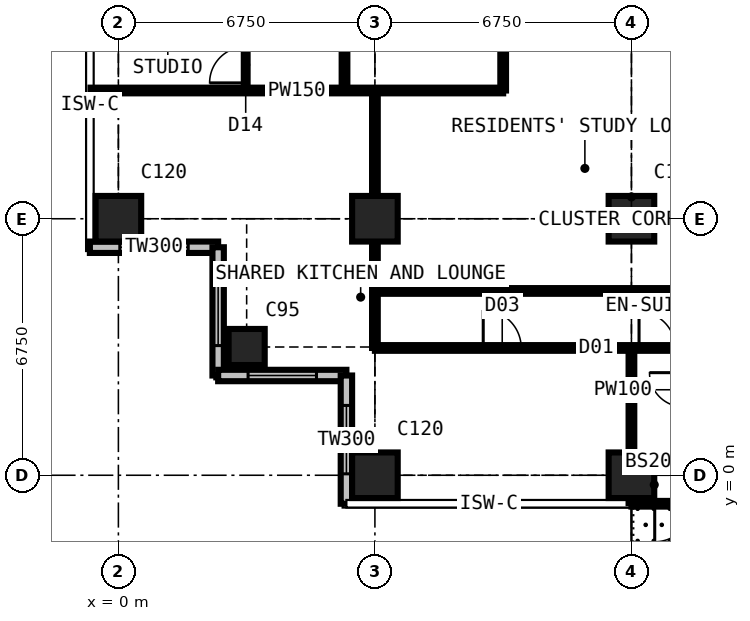
"""IFC4 building model, lengths in metres.
Left out: names, types, materials, properties, quantities, classifications, styles, units other than length and angle.
Written with IfcOpenShell. Run it as: python <this file> out.ifc"""

import sys

from ifc_helpers import new_model, si_unit, direction, frame, frame_2d, origin, origin_2d, place, context, subcontext, project, spatial, rectangle, extrude, element, fill, save


model = new_model("IFC4")
c1 = context("Model", 3, precision=1e-05, world=origin(), true_north=direction((0.0, 1.0)))
c2 = subcontext(c1, "Body", "Model", "MODEL_VIEW")
j1 = project(units=[si_unit("LENGTHUNIT", "METRE"), si_unit("PLANEANGLEUNIT", "RADIAN")], contexts=[c1])
p1 = place(None, origin())
s1 = spatial("IfcSite", under=j1, at=p1, CompositionType="ELEMENT")
p2 = place(p1, origin())
s2 = spatial("IfcBuilding", under=s1, at=p2, CompositionType="ELEMENT")
p3 = place(p2, frame((0.0, 0.0, 192.6)))
s3 = spatial("IfcBuildingStorey", under=s2, at=p3, CompositionType="ELEMENT", Elevation=192.6)
p4 = place(p3, frame((0.0, 6.75, 0.0), z_axis=(0.0, 0.0, 1.0), x_axis=(1.0, 0.0, 0.0)))
e1 = element("IfcColumn", 1, at=p4, inside=s3, PredefinedType="COLUMN", context=c2, shape_type="SweptSolid", body=[
    extrude(rectangle(XDim=1.2, YDim=1.2, at=origin_2d()), origin(), (0.0, 0.0, 1.0), 3.6),
])
p5 = place(p3, frame((3.375, 3.375, 0.0), z_axis=(0.0, 0.0, 1.0), x_axis=(1.0, 0.0, 0.0)))
e2 = element("IfcColumn", 2, at=p5, inside=s3, PredefinedType="COLUMN", context=c2, shape_type="SweptSolid", body=[
    extrude(rectangle(XDim=0.95, YDim=0.95, at=origin_2d()), origin(), (0.0, 0.0, 1.0), 3.6),
])
for number, where, z_axis, x_axis in (
    (3, (6.75, 0.0, 0.0), (0.0, 0.0, 1.0), (1.0, 0.0, 0.0)),
    (4, (6.75, 6.75, 0.0), (0.0, 0.0, 1.0), (1.0, 0.0, 0.0)),
    (5, (13.5, 0.0, 0.0), (0.0, 0.0, 1.0), (1.0, 0.0, 0.0)),
    (6, (13.5, 6.75, 0.0), (0.0, 0.0, 1.0), (1.0, 0.0, 0.0)),
):
    element("IfcColumn", number, at=place(p3, frame(where, z_axis=z_axis, x_axis=x_axis)), inside=s3, PredefinedType="COLUMN", context=c2, shape_type="SweptSolid", body=[
        extrude(rectangle(XDim=1.2, YDim=1.2, at=origin_2d()), origin(), (0.0, 0.0, 1.0), 3.6),
    ])
p6 = place(p3, frame((-0.75, 6.0, 0.0), z_axis=(0.0, 0.0, 1.0), x_axis=(1.0, 0.0, 0.0)))
e7 = element("IfcWall", 7, at=p6, inside=s3, PredefinedType="SOLIDWALL", context=c2, shape_type="SweptSolid", body=[
    extrude(rectangle(XDim=3.375, YDim=0.3, at=frame_2d((1.688, 0.0))), origin(), (0.0, 0.0, 1.0), 3.375),
])
p7 = place(p6, frame((0.788, 0.0, 0.6)))
e8 = element("IfcOpeningElement", 8, at=p7, cuts=e7, PredefinedType="OPENING", context=c2, shape_type="SweptSolid", body=[
    extrude(rectangle(XDim=1.8, YDim=2.1, at=frame_2d((0.9, 1.05))), frame((0.0, 0.16, 0.0), z_axis=(0.0, -1.0, 0.0), x_axis=(1.0, 0.0, 0.0)), (0.0, 0.0, 1.0), 0.32),
])
p8 = place(p3, frame((2.625, 6.0, 0.0), z_axis=(0.0, 0.0, 1.0), x_axis=(0.0, -1.0, 0.0)))
e9 = element("IfcWall", 9, at=p8, inside=s3, PredefinedType="SOLIDWALL", context=c2, shape_type="SweptSolid", body=[
    extrude(rectangle(XDim=3.375, YDim=0.3, at=frame_2d((1.688, 0.0))), origin(), (0.0, 0.0, 1.0), 3.375),
])
p9 = place(p8, frame((0.788, 0.0, 0.6)))
e10 = element("IfcOpeningElement", 10, at=p9, cuts=e9, PredefinedType="OPENING", context=c2, shape_type="SweptSolid", body=[
    extrude(rectangle(XDim=1.8, YDim=2.1, at=frame_2d((0.9, 1.05))), frame((0.0, 0.16, 0.0), z_axis=(0.0, -1.0, 0.0), x_axis=(1.0, 0.0, 0.0)), (0.0, 0.0, 1.0), 0.32),
])
p10 = place(p3, frame((2.625, 2.625, 0.0), z_axis=(0.0, 0.0, 1.0), x_axis=(1.0, 0.0, 0.0)))
e11 = element("IfcWall", 11, at=p10, inside=s3, PredefinedType="SOLIDWALL", context=c2, shape_type="SweptSolid", body=[
    extrude(rectangle(XDim=3.375, YDim=0.3, at=frame_2d((1.688, 0.0))), origin(), (0.0, 0.0, 1.0), 3.375),
])
p11 = place(p10, frame((0.788, 0.0, 0.6)))
e12 = element("IfcOpeningElement", 12, at=p11, cuts=e11, PredefinedType="OPENING", context=c2, shape_type="SweptSolid", body=[
    extrude(rectangle(XDim=1.8, YDim=2.1, at=frame_2d((0.9, 1.05))), frame((0.0, 0.16, 0.0), z_axis=(0.0, -1.0, 0.0), x_axis=(1.0, 0.0, 0.0)), (0.0, 0.0, 1.0), 0.32),
])
p12 = place(p3, frame((6.0, 2.625, 0.0), z_axis=(0.0, 0.0, 1.0), x_axis=(0.0, -1.0, 0.0)))
e13 = element("IfcWall", 13, at=p12, inside=s3, PredefinedType="SOLIDWALL", context=c2, shape_type="SweptSolid", body=[
    extrude(rectangle(XDim=3.375, YDim=0.3, at=frame_2d((1.688, 0.0))), origin(), (0.0, 0.0, 1.0), 3.375),
])
p13 = place(p12, frame((0.788, 0.0, 0.6)))
e14 = element("IfcOpeningElement", 14, at=p13, cuts=e13, PredefinedType="OPENING", context=c2, shape_type="SweptSolid", body=[
    extrude(rectangle(XDim=1.8, YDim=2.1, at=frame_2d((0.9, 1.05))), frame((0.0, 0.16, 0.0), z_axis=(0.0, -1.0, 0.0), x_axis=(1.0, 0.0, 0.0)), (0.0, 0.0, 1.0), 0.32),
])
p14 = place(p3, frame((20.25, -0.75, 0.0), z_axis=(0.0, 0.0, 1.0), x_axis=(-1.0, 0.0, 0.0)))
e15 = element("IfcWall", 15, at=p14, inside=s3, PredefinedType="SOLIDWALL", context=c2, shape_type="SweptSolid", body=[
    extrude(rectangle(XDim=6.75, YDim=0.15, at=frame_2d((3.375, 0.0))), origin(), (0.0, 0.0, 1.0), 3.375),
])
p15 = place(p14, frame((0.613, 0.0, 0.0)))
e16 = element("IfcOpeningElement", 16, at=p15, cuts=e15, PredefinedType="OPENING", context=c2, shape_type="SweptSolid", body=[
    extrude(rectangle(XDim=1.0, YDim=2.2, at=frame_2d((0.5, 1.1))), frame((0.0, 0.085, 0.0), z_axis=(0.0, -1.0, 0.0), x_axis=(1.0, 0.0, 0.0)), (0.0, 0.0, 1.0), 0.17),
])
p16 = place(p14, frame((1.725, 0.0, 0.9)))
e17 = element("IfcOpeningElement", 17, at=p16, cuts=e15, PredefinedType="OPENING", context=c2, shape_type="SweptSolid", body=[
    extrude(rectangle(XDim=1.2, YDim=1.8, at=frame_2d((0.6, 0.9))), frame((0.0, 0.085, 0.0), z_axis=(0.0, -1.0, 0.0), x_axis=(1.0, 0.0, 0.0)), (0.0, 0.0, 1.0), 0.17),
])
p17 = place(p14, frame((5.137, 0.0, 0.0)))
e18 = element("IfcOpeningElement", 18, at=p17, cuts=e15, PredefinedType="OPENING", context=c2, shape_type="SweptSolid", body=[
    extrude(rectangle(XDim=1.0, YDim=2.2, at=frame_2d((0.5, 1.1))), frame((0.0, 0.085, 0.0), z_axis=(0.0, -1.0, 0.0), x_axis=(1.0, 0.0, 0.0)), (0.0, 0.0, 1.0), 0.17),
])
p18 = place(p14, frame((3.825, 0.0, 0.9)))
e19 = element("IfcOpeningElement", 19, at=p18, cuts=e15, PredefinedType="OPENING", context=c2, shape_type="SweptSolid", body=[
    extrude(rectangle(XDim=1.2, YDim=1.8, at=frame_2d((0.6, 0.9))), frame((0.0, 0.085, 0.0), z_axis=(0.0, -1.0, 0.0), x_axis=(1.0, 0.0, 0.0)), (0.0, 0.0, 1.0), 0.17),
])
p19 = place(p3, frame((-0.734, 10.125, 0.0), z_axis=(0.0, 0.0, 1.0), x_axis=(1.0, 0.0, 0.0)))
e20 = element("IfcWall", 20, at=p19, inside=s3, PredefinedType="PARTITIONING", context=c2, shape_type="SweptSolid", body=[
    extrude(rectangle(XDim=10.859, YDim=0.15, at=frame_2d((5.429, 0.0))), origin(), (0.0, 0.0, 1.0), 3.375),
])
p20 = place(p3, frame((3.35, 10.125, 0.0), z_axis=(0.0, 0.0, 1.0), x_axis=(0.0, 1.0, 0.0)))
e21 = element("IfcWall", 21, at=p20, inside=s3, PredefinedType="PARTITIONING", context=c2, shape_type="SweptSolid", body=[
    extrude(rectangle(XDim=16.875, YDim=0.1, at=frame_2d((8.438, 0.0))), origin(), (0.0, 0.0, 1.0), 3.375),
])
p21 = place(p20, frame((0.2, 0.0, 0.0)))
e22 = element("IfcOpeningElement", 22, at=p21, cuts=e21, PredefinedType="OPENING", context=c2, shape_type="SweptSolid", body=[
    extrude(rectangle(XDim=0.95, YDim=2.2, at=frame_2d((0.475, 1.1))), frame((0.0, 0.06, 0.0), z_axis=(0.0, -1.0, 0.0), x_axis=(1.0, 0.0, 0.0)), (0.0, 0.0, 1.0), 0.12),
])
p22 = place(p20, frame((3.575, 0.0, 0.0)))
e23 = element("IfcOpeningElement", 23, at=p22, cuts=e21, PredefinedType="OPENING", context=c2, shape_type="SweptSolid", body=[
    extrude(rectangle(XDim=0.95, YDim=2.2, at=frame_2d((0.475, 1.1))), frame((0.0, 0.06, 0.0), z_axis=(0.0, -1.0, 0.0), x_axis=(1.0, 0.0, 0.0)), (0.0, 0.0, 1.0), 0.12),
])
p23 = place(p20, frame((6.95, 0.0, 0.0)))
e24 = element("IfcOpeningElement", 24, at=p23, cuts=e21, PredefinedType="OPENING", context=c2, shape_type="SweptSolid", body=[
    extrude(rectangle(XDim=0.95, YDim=2.2, at=frame_2d((0.475, 1.1))), frame((0.0, 0.06, 0.0), z_axis=(0.0, -1.0, 0.0), x_axis=(1.0, 0.0, 0.0)), (0.0, 0.0, 1.0), 0.12),
])
p24 = place(p3, frame((5.95, 10.125, 0.0), z_axis=(0.0, 0.0, 1.0), x_axis=(0.0, 1.0, 0.0)))
e25 = element("IfcWall", 25, at=p24, inside=s3, PredefinedType="PARTITIONING", context=c2, shape_type="SweptSolid", body=[
    extrude(rectangle(XDim=2.65, YDim=0.15, at=frame_2d((1.325, 0.0))), origin(), (0.0, 0.0, 1.0), 3.375),
])
p25 = place(p3, frame((6.75, 3.35, 0.0), z_axis=(0.0, 0.0, 1.0), x_axis=(0.0, 1.0, 0.0)))
e26 = element("IfcWall", 26, at=p25, inside=s3, PredefinedType="PARTITIONING", context=c2, shape_type="SweptSolid", body=[
    extrude(rectangle(XDim=6.775, YDim=0.15, at=frame_2d((3.387, 0.0))), origin(), (0.0, 0.0, 1.0), 2.877),
])
p26 = place(p3, frame((6.75, 3.35, 0.0), z_axis=(0.0, 0.0, 1.0), x_axis=(1.0, 0.0, 0.0)))
e27 = element("IfcWall", 27, at=p26, inside=s3, PredefinedType="PARTITIONING", context=c2, shape_type="SweptSolid", body=[
    extrude(rectangle(XDim=20.25, YDim=0.15, at=frame_2d((10.125, 0.0))), origin(), (0.0, 0.0, 1.0), 3.375),
])
p27 = place(p26, frame((2.85, 0.0, 0.0)))
e28 = element("IfcOpeningElement", 28, at=p27, cuts=e27, PredefinedType="OPENING", context=c2, shape_type="SweptSolid", body=[
    extrude(rectangle(XDim=1.0, YDim=2.2, at=frame_2d((0.5, 1.1))), frame((0.0, 0.085, 0.0), z_axis=(0.0, -1.0, 0.0), x_axis=(1.0, 0.0, 0.0)), (0.0, 0.0, 1.0), 0.17),
])
p28 = place(p26, frame((6.95, 0.0, 0.0)))
e29 = element("IfcOpeningElement", 29, at=p28, cuts=e27, PredefinedType="OPENING", context=c2, shape_type="SweptSolid", body=[
    extrude(rectangle(XDim=0.95, YDim=2.2, at=frame_2d((0.475, 1.1))), frame((0.0, 0.085, 0.0), z_axis=(0.0, -1.0, 0.0), x_axis=(1.0, 0.0, 0.0)), (0.0, 0.0, 1.0), 0.17),
])
p29 = place(p26, frame((10.325, 0.0, 0.0)))
e30 = element("IfcOpeningElement", 30, at=p29, cuts=e27, PredefinedType="OPENING", context=c2, shape_type="SweptSolid", body=[
    extrude(rectangle(XDim=0.95, YDim=2.2, at=frame_2d((0.475, 1.1))), frame((0.0, 0.085, 0.0), z_axis=(0.0, -1.0, 0.0), x_axis=(1.0, 0.0, 0.0)), (0.0, 0.0, 1.0), 0.17),
])
p30 = place(p26, frame((15.1, 0.0, 0.0)))
e31 = element("IfcOpeningElement", 31, at=p30, cuts=e27, PredefinedType="OPENING", context=c2, shape_type="SweptSolid", body=[
    extrude(rectangle(XDim=0.95, YDim=2.2, at=frame_2d((0.475, 1.1))), frame((0.0, 0.085, 0.0), z_axis=(0.0, -1.0, 0.0), x_axis=(1.0, 0.0, 0.0)), (0.0, 0.0, 1.0), 0.17),
])
p31 = place(p3, frame((6.75, 4.85, 0.0), z_axis=(0.0, 0.0, 1.0), x_axis=(1.0, 0.0, 0.0)))
e32 = element("IfcWall", 32, at=p31, inside=s3, PredefinedType="PARTITIONING", context=c2, shape_type="SweptSolid", body=[
    extrude(rectangle(XDim=11.05, YDim=0.15, at=frame_2d((5.525, 0.0))), origin(), (0.0, 0.0, 1.0), 3.375),
])
p32 = place(p3, frame((10.125, 10.125, 0.0), z_axis=(0.0, 0.0, 1.0), x_axis=(0.0, 1.0, 0.0)))
e33 = element("IfcWall", 33, at=p32, inside=s3, PredefinedType="PARTITIONING", context=c2, shape_type="SweptSolid", body=[
    extrude(rectangle(XDim=1.175, YDim=0.15, at=frame_2d((0.587, 0.0))), origin(), (0.0, 0.0, 1.0), 3.375),
])
p33 = place(p3, frame((13.5, -0.734, 0.0), z_axis=(0.0, 0.0, 1.0), x_axis=(0.0, 1.0, 0.0)))
e34 = element("IfcWall", 34, at=p33, inside=s3, PredefinedType="PARTITIONING", context=c2, shape_type="SweptSolid", body=[
    extrude(rectangle(XDim=4.084, YDim=0.15, at=frame_2d((2.042, 0.0))), origin(), (0.0, 0.0, 1.0), 2.877),
])
p34 = place(p7, origin())
e35 = element("IfcWindow", 35, at=p34, inside=s3, PartitioningType="SINGLE_PANEL", PredefinedType="WINDOW", context=c2, shape_type="SweptSolid", body=[
    extrude(rectangle(XDim=1.8, YDim=2.1, at=frame_2d((0.9, 1.05))), frame((0.0, 0.03, 0.0), z_axis=(0.0, -1.0, 0.0), x_axis=(1.0, 0.0, 0.0)), (0.0, 0.0, 1.0), 0.06),
])
fill(e8, e35)
p35 = place(p9, origin())
e36 = element("IfcWindow", 36, at=p35, inside=s3, PartitioningType="SINGLE_PANEL", PredefinedType="WINDOW", context=c2, shape_type="SweptSolid", body=[
    extrude(rectangle(XDim=1.8, YDim=2.1, at=frame_2d((0.9, 1.05))), frame((0.0, 0.03, 0.0), z_axis=(0.0, -1.0, 0.0), x_axis=(1.0, 0.0, 0.0)), (0.0, 0.0, 1.0), 0.06),
])
fill(e10, e36)
p36 = place(p11, origin())
e37 = element("IfcWindow", 37, at=p36, inside=s3, PartitioningType="SINGLE_PANEL", PredefinedType="WINDOW", context=c2, shape_type="SweptSolid", body=[
    extrude(rectangle(XDim=1.8, YDim=2.1, at=frame_2d((0.9, 1.05))), frame((0.0, 0.03, 0.0), z_axis=(0.0, -1.0, 0.0), x_axis=(1.0, 0.0, 0.0)), (0.0, 0.0, 1.0), 0.06),
])
fill(e12, e37)
p37 = place(p13, origin())
e38 = element("IfcWindow", 38, at=p37, inside=s3, PartitioningType="SINGLE_PANEL", PredefinedType="WINDOW", context=c2, shape_type="SweptSolid", body=[
    extrude(rectangle(XDim=1.8, YDim=2.1, at=frame_2d((0.9, 1.05))), frame((0.0, 0.03, 0.0), z_axis=(0.0, -1.0, 0.0), x_axis=(1.0, 0.0, 0.0)), (0.0, 0.0, 1.0), 0.06),
])
fill(e14, e38)
p38 = place(p17, origin())
e39 = element("IfcDoor", 39, at=p38, inside=s3, OperationType="SINGLE_SWING_RIGHT", PredefinedType="DOOR", context=c2, shape_type="SweptSolid", body=[
    extrude(rectangle(XDim=1.0, YDim=2.2, at=frame_2d((0.5, 1.1))), frame((0.0, 0.025, 0.0), z_axis=(0.0, -1.0, 0.0), x_axis=(1.0, 0.0, 0.0)), (0.0, 0.0, 1.0), 0.05),
])
fill(e18, e39)
p39 = place(p27, origin())
e40 = element("IfcDoor", 40, at=p39, inside=s3, OperationType="SINGLE_SWING_LEFT", PredefinedType="DOOR", context=c2, shape_type="SweptSolid", body=[
    extrude(rectangle(XDim=1.0, YDim=2.2, at=frame_2d((0.5, 1.1))), frame((0.0, 0.025, 0.0), z_axis=(0.0, -1.0, 0.0), x_axis=(1.0, 0.0, 0.0)), (0.0, 0.0, 1.0), 0.05),
])
fill(e28, e40)
p40 = place(p28, origin())
e41 = element("IfcDoor", 41, at=p40, inside=s3, OperationType="SINGLE_SWING_LEFT", PredefinedType="DOOR", context=c2, shape_type="SweptSolid", body=[
    extrude(rectangle(XDim=0.95, YDim=2.2, at=frame_2d((0.475, 1.1))), frame((0.0, 0.025, 0.0), z_axis=(0.0, -1.0, 0.0), x_axis=(1.0, 0.0, 0.0)), (0.0, 0.0, 1.0), 0.05),
])
fill(e29, e41)
p41 = place(p21, origin())
e42 = element("IfcDoor", 42, at=p41, inside=s3, OperationType="SINGLE_SWING_LEFT", PredefinedType="DOOR", context=c2, shape_type="SweptSolid", body=[
    extrude(rectangle(XDim=0.95, YDim=2.2, at=frame_2d((0.475, 1.1))), frame((0.0, 0.025, 0.0), z_axis=(0.0, -1.0, 0.0), x_axis=(1.0, 0.0, 0.0)), (0.0, 0.0, 1.0), 0.05),
])
fill(e22, e42)
save(model, sys.argv[1])
